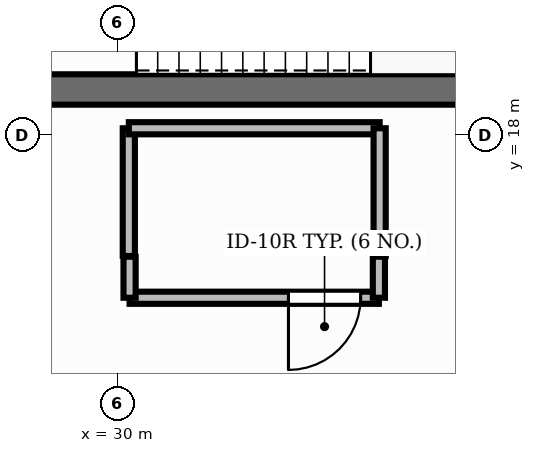
"""IFC4 building model, lengths in metres.
Left out: names, types, materials, properties, quantities, classifications, styles, units other than length and angle.
Written with IfcOpenShell. Run it as: python <this file> out.ifc"""

import sys

from ifc_helpers import new_model, si_unit, direction, frame, frame_2d, origin, place, context, subcontext, project, spatial, rectangle, extrude, element, fill, save


model = new_model("IFC4")
c1 = context("Model", 3, precision=1e-05, world=origin(), true_north=direction((0.0, 1.0)))
c2 = subcontext(c1, "Body", "Model", "MODEL_VIEW")
j1 = project(units=[si_unit("LENGTHUNIT", "METRE"), si_unit("PLANEANGLEUNIT", "RADIAN")], contexts=[c1])
p1 = place(None, origin())
s1 = spatial("IfcSite", under=j1, at=p1, CompositionType="ELEMENT")
p2 = place(p1, origin())
s2 = spatial("IfcBuilding", under=s1, at=p2, CompositionType="ELEMENT")
p3 = place(p2, frame((0.0, 0.0, 171.0)))
s3 = spatial("IfcBuildingStorey", under=s2, at=p3, CompositionType="ELEMENT", Elevation=171.0)
p4 = place(p3, frame((28.852, 18.6, 0.0), z_axis=(0.0, 0.0, 1.0), x_axis=(1.0, 0.0, 0.0)))
e1 = element("IfcWall", 1, at=p4, inside=s3, PredefinedType="SHEAR", context=c2, shape_type="SweptSolid", body=[
    extrude(rectangle(XDim=8.198, YDim=0.4, at=frame_2d((4.099, 0.0))), origin(), (0.0, 0.0, 1.0), 3.9),
])
p5 = place(p3, frame((33.44, 15.86, 0.0), z_axis=(0.0, 0.0, 1.0), x_axis=(-1.0, 0.0, 0.0)))
e2 = element("IfcWall", 2, at=p5, inside=s3, PredefinedType="PARTITIONING", context=c2, shape_type="SweptSolid", body=[
    extrude(rectangle(XDim=3.28, YDim=0.16, at=frame_2d((1.64, 0.0))), origin(), (0.0, 0.0, 1.0), 2.91),
])
p6 = place(p5, frame((0.24, 0.0, 0.0)))
e3 = element("IfcOpeningElement", 3, at=p6, cuts=e2, PredefinedType="OPENING", context=c2, shape_type="SweptSolid", body=[
    extrude(rectangle(XDim=0.95, YDim=2.15, at=frame_2d((0.475, 1.075))), frame((0.0, 0.095, 0.0), z_axis=(0.0, -1.0, 0.0), x_axis=(1.0, 0.0, 0.0)), (0.0, 0.0, 1.0), 0.19),
])
for number, where, z_axis, x_axis in (
    (4, (33.44, 16.4, 0.0), (0.0, 0.0, 1.0), (0.0, -1.0, 0.0)),
    (5, (30.16, 15.86, 0.0), (0.0, 0.0, 1.0), (0.0, 1.0, 0.0)),
):
    element("IfcWall", number, at=place(p3, frame(where, z_axis=z_axis, x_axis=x_axis)), inside=s3, PredefinedType="PARTITIONING", context=c2, shape_type="SweptSolid", body=[
        extrude(rectangle(XDim=0.54, YDim=0.16, at=frame_2d((0.27, 0.0))), origin(), (0.0, 0.0, 1.0), 2.91),
    ])
p7 = place(p3, frame((30.15, 16.41, 0.0), z_axis=(0.0, 0.0, 1.0), x_axis=(0.0, 1.0, 0.0)))
e6 = element("IfcWall", 6, at=p7, inside=s3, PredefinedType="PARTITIONING", context=c2, shape_type="SweptSolid", body=[
    extrude(rectangle(XDim=1.68, YDim=0.16, at=frame_2d((0.84, 0.0))), origin(), (0.0, 0.0, 1.0), 2.91),
])
p8 = place(p3, frame((30.15, 18.09, 0.0), z_axis=(0.0, 0.0, 1.0), x_axis=(1.0, 0.0, 0.0)))
e7 = element("IfcWall", 7, at=p8, inside=s3, PredefinedType="PARTITIONING", context=c2, shape_type="SweptSolid", body=[
    extrude(rectangle(XDim=3.3, YDim=0.16, at=frame_2d((1.65, 0.0))), origin(), (0.0, 0.0, 1.0), 2.91),
])
p9 = place(p3, frame((33.45, 18.09, 0.0), z_axis=(0.0, 0.0, 1.0), x_axis=(0.0, -1.0, 0.0)))
e8 = element("IfcWall", 8, at=p9, inside=s3, PredefinedType="PARTITIONING", context=c2, shape_type="SweptSolid", body=[
    extrude(rectangle(XDim=1.68, YDim=0.16, at=frame_2d((0.84, 0.0))), origin(), (0.0, 0.0, 1.0), 2.91),
])
p10 = place(p6, origin())
e9 = element("IfcDoor", 9, at=p10, inside=s3, OperationType="SINGLE_SWING_RIGHT", PredefinedType="DOOR", context=c2, shape_type="SweptSolid", body=[
    extrude(rectangle(XDim=0.95, YDim=2.15, at=frame_2d((0.475, 1.075))), frame((0.0, 0.025, 0.0), z_axis=(0.0, -1.0, 0.0), x_axis=(1.0, 0.0, 0.0)), (0.0, 0.0, 1.0), 0.05),
])
fill(e3, e9)
save(model, sys.argv[1])
